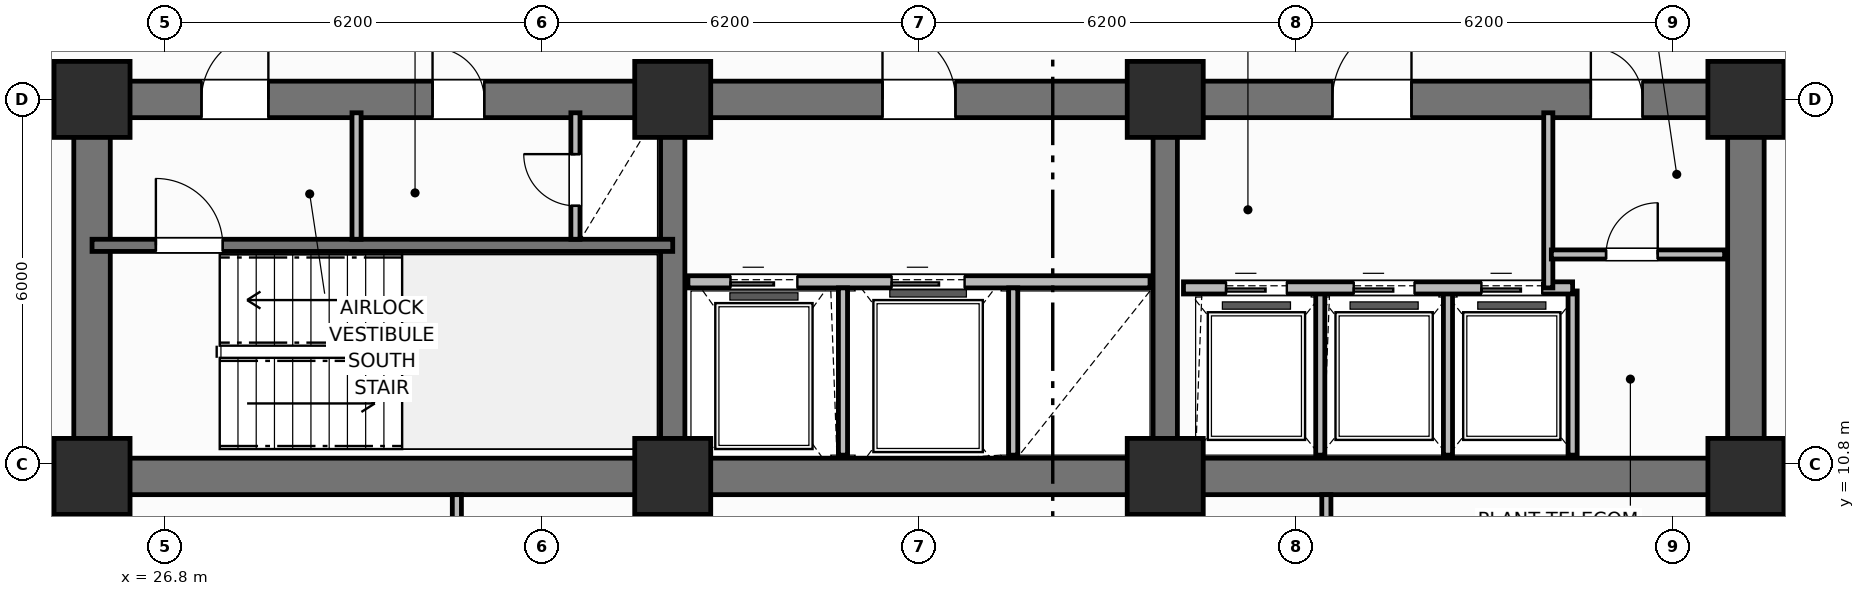
"""IFC4 building model, lengths in metres.
Left out: names, types, materials, properties, quantities, classifications, styles, units other than length and angle.
Written with IfcOpenShell. Run it as: python <this file> out.ifc"""

import sys

from ifc_helpers import new_model, si_unit, direction, frame, frame_2d, origin, origin_2d, place, context, subcontext, project, spatial, rectangle, extrude, element, fill, save


model = new_model("IFC4")
c1 = context("Model", 3, precision=1e-05, world=origin(), true_north=direction((0.0, 1.0)))
c2 = subcontext(c1, "Body", "Model", "MODEL_VIEW")
j1 = project(units=[si_unit("LENGTHUNIT", "METRE"), si_unit("PLANEANGLEUNIT", "RADIAN")], contexts=[c1])
p1 = place(None, origin())
s1 = spatial("IfcSite", under=j1, at=p1, CompositionType="ELEMENT")
p2 = place(p1, origin())
s2 = spatial("IfcBuilding", under=s1, at=p2, CompositionType="ELEMENT")
p3 = place(p2, frame((0.0, 0.0, 47.3)))
s3 = spatial("IfcBuildingStorey", under=s2, at=p3, CompositionType="ELEMENT", Elevation=47.3)
p4 = place(p3, frame((52.8, 10.6, 0.0), z_axis=(0.0, 0.0, 1.0), x_axis=(-1.0, 0.0, 0.0)))
e1 = element("IfcWall", 1, at=p4, inside=s3, PredefinedType="SHEAR", context=c2, shape_type="SweptSolid", body=[
    extrude(rectangle(XDim=27.2, YDim=0.6, at=frame_2d((13.6, 0.0))), origin(), (0.0, 0.0, 1.0), 3.7),
])
for number, where, z_axis, x_axis in (
    (2, (25.6, 10.9, 0.0), (0.0, 0.0, 1.0), (0.0, 1.0, 0.0)),
    (3, (52.8, 10.9, 0.0), (0.0, 0.0, 1.0), (0.0, 1.0, 0.0)),
):
    element("IfcWall", number, at=place(p3, frame(where, z_axis=z_axis, x_axis=x_axis)), inside=s3, PredefinedType="SHEAR", context=c2, shape_type="SweptSolid", body=[
        extrude(rectangle(XDim=5.6, YDim=0.6, at=frame_2d((2.8, 0.0))), origin(), (0.0, 0.0, 1.0), 3.7),
    ])
p5 = place(p3, frame((25.6, 16.8, 0.0), z_axis=(0.0, 0.0, 1.0), x_axis=(1.0, 0.0, 0.0)))
e4 = element("IfcWall", 4, at=p5, inside=s3, PredefinedType="SHEAR", context=c2, shape_type="SweptSolid", body=[
    extrude(rectangle(XDim=27.2, YDim=0.6, at=frame_2d((13.6, 0.0))), origin(), (0.0, 0.0, 1.0), 3.7),
])
p6 = place(p5, frame((1.8, 0.0, 0.0)))
e5 = element("IfcOpeningElement", 5, at=p6, cuts=e4, PredefinedType="OPENING", context=c2, shape_type="SweptSolid", body=[
    extrude(rectangle(XDim=1.1, YDim=2.15, at=frame_2d((0.55, 1.075))), frame((0.0, 0.31, 0.0), z_axis=(0.0, -1.0, 0.0), x_axis=(1.0, 0.0, 0.0)), (0.0, 0.0, 1.0), 0.62),
])
p7 = place(p5, frame((5.6, 0.0, 0.0)))
e6 = element("IfcOpeningElement", 6, at=p7, cuts=e4, PredefinedType="OPENING", context=c2, shape_type="SweptSolid", body=[
    extrude(rectangle(XDim=0.85, YDim=2.1, at=frame_2d((0.425, 1.05))), frame((0.0, 0.31, 0.0), z_axis=(0.0, -1.0, 0.0), x_axis=(1.0, 0.0, 0.0)), (0.0, 0.0, 1.0), 0.62),
])
p8 = place(p5, frame((13.0, 0.0, 0.0)))
e7 = element("IfcOpeningElement", 7, at=p8, cuts=e4, PredefinedType="OPENING", context=c2, shape_type="SweptSolid", body=[
    extrude(rectangle(XDim=1.2, YDim=2.15, at=frame_2d((0.6, 1.075))), frame((0.0, 0.31, 0.0), z_axis=(0.0, -1.0, 0.0), x_axis=(1.0, 0.0, 0.0)), (0.0, 0.0, 1.0), 0.62),
])
p9 = place(p5, frame((20.4, 0.0, 0.0)))
e8 = element("IfcOpeningElement", 8, at=p9, cuts=e4, PredefinedType="OPENING", context=c2, shape_type="SweptSolid", body=[
    extrude(rectangle(XDim=1.3, YDim=2.2, at=frame_2d((0.65, 1.1))), frame((0.0, 0.31, 0.0), z_axis=(0.0, -1.0, 0.0), x_axis=(1.0, 0.0, 0.0)), (0.0, 0.0, 1.0), 0.62),
])
p10 = place(p5, frame((24.65, 0.0, 0.0)))
e9 = element("IfcOpeningElement", 9, at=p10, cuts=e4, PredefinedType="OPENING", context=c2, shape_type="SweptSolid", body=[
    extrude(rectangle(XDim=0.85, YDim=2.1, at=frame_2d((0.425, 1.05))), frame((0.0, 0.31, 0.0), z_axis=(0.0, -1.0, 0.0), x_axis=(1.0, 0.0, 0.0)), (0.0, 0.0, 1.0), 0.62),
])
for number, where, z_axis, x_axis in (
    (10, (35.15, 10.9, 0.0), (0.0, 0.0, 1.0), (0.0, 1.0, 0.0)),
    (11, (43.25, 10.9, 0.0), (0.0, 0.0, 1.0), (0.0, 1.0, 0.0)),
):
    element("IfcWall", number, at=place(p3, frame(where, z_axis=z_axis, x_axis=x_axis)), inside=s3, PredefinedType="SHEAR", context=c2, shape_type="SweptSolid", body=[
        extrude(rectangle(XDim=5.6, YDim=0.4, at=frame_2d((2.8, 0.0))), origin(), (0.0, 0.0, 1.0), 3.7),
    ])
for number, where, z_axis, x_axis in (
    (12, (25.6, 10.6, 0.0), (0.0, 0.0, 1.0), (1.0, 0.0, 0.0)),
    (13, (25.6, 16.8, 0.0), (0.0, 0.0, 1.0), (1.0, 0.0, 0.0)),
    (14, (35.15, 10.6, 0.0), (0.0, 0.0, 1.0), (1.0, 0.0, 0.0)),
    (15, (35.15, 16.8, 0.0), (0.0, 0.0, 1.0), (1.0, 0.0, 0.0)),
    (16, (43.25, 10.6, 0.0), (0.0, 0.0, 1.0), (1.0, 0.0, 0.0)),
    (17, (43.25, 16.8, 0.0), (0.0, 0.0, 1.0), (1.0, 0.0, 0.0)),
    (18, (52.8, 10.6, 0.0), (0.0, 0.0, 1.0), (1.0, 0.0, 0.0)),
    (19, (52.8, 16.8, 0.0), (0.0, 0.0, 1.0), (1.0, 0.0, 0.0)),
):
    element("IfcColumn", number, at=place(p3, frame(where, z_axis=z_axis, x_axis=x_axis)), inside=s3, PredefinedType="COLUMN", context=c2, shape_type="SweptSolid", body=[
        extrude(rectangle(XDim=1.25, YDim=1.25, at=origin_2d()), origin(), (0.0, 0.0, 1.0), 3.7),
    ])
p11 = place(p3, frame((25.6, 14.4, 0.0), z_axis=(0.0, 0.0, 1.0), x_axis=(1.0, 0.0, 0.0)))
e20 = element("IfcWall", 20, at=p11, inside=s3, PredefinedType="SHEAR", context=c2, shape_type="SweptSolid", body=[
    extrude(rectangle(XDim=9.55, YDim=0.2, at=frame_2d((4.775, 0.0))), origin(), (0.0, 0.0, 1.0), 3.7),
])
p12 = place(p11, frame((1.05, 0.0, 0.0)))
e21 = element("IfcOpeningElement", 21, at=p12, cuts=e20, PredefinedType="OPENING", context=c2, shape_type="SweptSolid", body=[
    extrude(rectangle(XDim=1.1, YDim=2.15, at=frame_2d((0.55, 1.075))), frame((0.0, 0.11, 0.0), z_axis=(0.0, -1.0, 0.0), x_axis=(1.0, 0.0, 0.0)), (0.0, 0.0, 1.0), 0.22),
])
p13 = place(p3, frame((29.95, 14.5, 0.0), z_axis=(0.0, 0.0, 1.0), x_axis=(0.0, 1.0, 0.0)))
e22 = element("IfcWall", 22, at=p13, inside=s3, PredefinedType="PARTITIONING", context=c2, shape_type="SweptSolid", body=[
    extrude(rectangle(XDim=2.08, YDim=0.15, at=frame_2d((1.04, 0.0))), origin(), (0.0, 0.0, 1.0), 2.53),
])
p14 = place(p3, frame((33.55, 14.5, 0.0), z_axis=(0.0, 0.0, 1.0), x_axis=(0.0, 1.0, 0.0)))
e23 = element("IfcWall", 23, at=p14, inside=s3, PredefinedType="PARTITIONING", context=c2, shape_type="SweptSolid", body=[
    extrude(rectangle(XDim=2.08, YDim=0.15, at=frame_2d((1.04, 0.0))), origin(), (0.0, 0.0, 1.0), 2.53),
])
p15 = place(p14, frame((0.55, 0.0, 0.0)))
e24 = element("IfcOpeningElement", 24, at=p15, cuts=e23, PredefinedType="OPENING", context=c2, shape_type="SweptSolid", body=[
    extrude(rectangle(XDim=0.85, YDim=2.05, at=frame_2d((0.425, 1.025))), frame((0.0, 0.085, 0.0), z_axis=(0.0, -1.0, 0.0), x_axis=(1.0, 0.0, 0.0)), (0.0, 0.0, 1.0), 0.17),
])
p16 = place(p3, frame((35.4, 13.8, 0.0), z_axis=(0.0, 0.0, 1.0), x_axis=(1.0, 0.0, 0.0)))
e25 = element("IfcWall", 25, at=p16, inside=s3, PredefinedType="PARTITIONING", context=c2, shape_type="SweptSolid", body=[
    extrude(rectangle(XDim=7.6, YDim=0.2, at=frame_2d((3.8, 0.0))), origin(), (0.0, 0.0, 1.0), 2.3),
])
p17 = place(p16, frame((0.7, 0.0, 0.0)))
e26 = element("IfcOpeningElement", 26, at=p17, cuts=e25, PredefinedType="OPENING", context=c2, shape_type="SweptSolid", body=[
    extrude(rectangle(XDim=1.1, YDim=2.15, at=frame_2d((0.55, 1.075))), frame((0.0, 0.11, 0.0), z_axis=(0.0, -1.0, 0.0), x_axis=(1.0, 0.0, 0.0)), (0.0, 0.0, 1.0), 0.22),
])
p18 = place(p16, frame((3.35, 0.0, 0.0)))
e27 = element("IfcOpeningElement", 27, at=p18, cuts=e25, PredefinedType="OPENING", context=c2, shape_type="SweptSolid", body=[
    extrude(rectangle(XDim=1.2, YDim=2.15, at=frame_2d((0.6, 1.075))), frame((0.0, 0.11, 0.0), z_axis=(0.0, -1.0, 0.0), x_axis=(1.0, 0.0, 0.0)), (0.0, 0.0, 1.0), 0.22),
])
for number, where, z_axis, x_axis in (
    (28, (37.95, 10.95, 0.0), (0.0, 0.0, 1.0), (0.0, 1.0, 0.0)),
    (29, (40.75, 10.95, 0.0), (0.0, 0.0, 1.0), (0.0, 1.0, 0.0)),
):
    element("IfcWall", number, at=place(p3, frame(where, z_axis=z_axis, x_axis=x_axis)), inside=s3, PredefinedType="PARTITIONING", context=c2, shape_type="SweptSolid", body=[
        extrude(rectangle(XDim=2.75, YDim=0.15, at=frame_2d((1.375, 0.0))), origin(), (0.0, 0.0, 1.0), 2.53),
    ])
for number, where, z_axis, x_axis in (
    (30, (45.8, 10.95, 0.0), (0.0, 0.0, 1.0), (0.0, 1.0, 0.0)),
    (31, (47.9, 10.95, 0.0), (0.0, 0.0, 1.0), (0.0, 1.0, 0.0)),
    (32, (49.95, 10.95, 0.0), (0.0, 0.0, 1.0), (0.0, 1.0, 0.0)),
):
    element("IfcWall", number, at=place(p3, frame(where, z_axis=z_axis, x_axis=x_axis)), inside=s3, PredefinedType="PARTITIONING", context=c2, shape_type="SweptSolid", body=[
        extrude(rectangle(XDim=2.7, YDim=0.15, at=frame_2d((1.35, 0.0))), origin(), (0.0, 0.0, 1.0), 2.53),
    ])
p19 = place(p3, frame((43.55, 13.7, 0.0), z_axis=(0.0, 0.0, 1.0), x_axis=(1.0, 0.0, 0.0)))
e33 = element("IfcWall", 33, at=p19, inside=s3, PredefinedType="PARTITIONING", context=c2, shape_type="SweptSolid", body=[
    extrude(rectangle(XDim=6.4, YDim=0.2, at=frame_2d((3.2, 0.0))), origin(), (0.0, 0.0, 1.0), 2.53),
])
p20 = place(p19, frame((0.7, 0.0, 0.0)))
e34 = element("IfcOpeningElement", 34, at=p20, cuts=e33, PredefinedType="OPENING", context=c2, shape_type="SweptSolid", body=[
    extrude(rectangle(XDim=1.0, YDim=2.15, at=frame_2d((0.5, 1.075))), frame((0.0, 0.11, 0.0), z_axis=(0.0, -1.0, 0.0), x_axis=(1.0, 0.0, 0.0)), (0.0, 0.0, 1.0), 0.22),
])
p21 = place(p19, frame((2.8, 0.0, 0.0)))
e35 = element("IfcOpeningElement", 35, at=p21, cuts=e33, PredefinedType="OPENING", context=c2, shape_type="SweptSolid", body=[
    extrude(rectangle(XDim=1.0, YDim=2.15, at=frame_2d((0.5, 1.075))), frame((0.0, 0.11, 0.0), z_axis=(0.0, -1.0, 0.0), x_axis=(1.0, 0.0, 0.0)), (0.0, 0.0, 1.0), 0.22),
])
p22 = place(p19, frame((4.9, 0.0, 0.0)))
e36 = element("IfcOpeningElement", 36, at=p22, cuts=e33, PredefinedType="OPENING", context=c2, shape_type="SweptSolid", body=[
    extrude(rectangle(XDim=1.0, YDim=2.15, at=frame_2d((0.5, 1.075))), frame((0.0, 0.11, 0.0), z_axis=(0.0, -1.0, 0.0), x_axis=(1.0, 0.0, 0.0)), (0.0, 0.0, 1.0), 0.22),
])
p23 = place(p3, frame((49.55, 13.7, 0.0), z_axis=(0.0, 0.0, 1.0), x_axis=(0.0, 1.0, 0.0)))
e37 = element("IfcWall", 37, at=p23, inside=s3, PredefinedType="PARTITIONING", context=c2, shape_type="SweptSolid", body=[
    extrude(rectangle(XDim=2.88, YDim=0.15, at=frame_2d((1.44, 0.0))), origin(), (0.0, 0.0, 1.0), 2.53),
])
p24 = place(p3, frame((49.6, 14.25, 0.0), z_axis=(0.0, 0.0, 1.0), x_axis=(1.0, 0.0, 0.0)))
e38 = element("IfcWall", 38, at=p24, inside=s3, PredefinedType="PARTITIONING", context=c2, shape_type="SweptSolid", body=[
    extrude(rectangle(XDim=2.85, YDim=0.15, at=frame_2d((1.425, 0.0))), origin(), (0.0, 0.0, 1.0), 2.53),
])
p25 = place(p24, frame((0.9, 0.0, 0.0)))
e39 = element("IfcOpeningElement", 39, at=p25, cuts=e38, PredefinedType="OPENING", context=c2, shape_type="SweptSolid", body=[
    extrude(rectangle(XDim=0.85, YDim=2.1, at=frame_2d((0.425, 1.05))), frame((0.0, 0.085, 0.0), z_axis=(0.0, -1.0, 0.0), x_axis=(1.0, 0.0, 0.0)), (0.0, 0.0, 1.0), 0.17),
])
p26 = place(p3, frame((31.6, 4.97, 0.0), z_axis=(0.0, 0.0, 1.0), x_axis=(0.0, 1.0, 0.0)))
e40 = element("IfcWall", 40, at=p26, inside=s3, PredefinedType="PARTITIONING", context=c2, shape_type="SweptSolid", body=[
    extrude(rectangle(XDim=5.33, YDim=0.15, at=frame_2d((2.665, 0.0))), origin(), (0.0, 0.0, 1.0), 2.53),
])
p27 = place(p26, frame((1.95, 0.0, 0.0)))
e41 = element("IfcOpeningElement", 41, at=p27, cuts=e40, PredefinedType="OPENING", context=c2, shape_type="SweptSolid", body=[
    extrude(rectangle(XDim=0.9, YDim=2.1, at=frame_2d((0.45, 1.05))), frame((0.0, 0.085, 0.0), z_axis=(0.0, -1.0, 0.0), x_axis=(1.0, 0.0, 0.0)), (0.0, 0.0, 1.0), 0.17),
])
p28 = place(p3, frame((45.9, 4.97, 0.0), z_axis=(0.0, 0.0, 1.0), x_axis=(0.0, 1.0, 0.0)))
e42 = element("IfcWall", 42, at=p28, inside=s3, PredefinedType="PARTITIONING", context=c2, shape_type="SweptSolid", body=[
    extrude(rectangle(XDim=5.33, YDim=0.15, at=frame_2d((2.665, 0.0))), origin(), (0.0, 0.0, 1.0), 2.53),
])
p29 = place(p3, frame((25.4, 6.27, 0.0), z_axis=(0.0, 0.0, 1.0), x_axis=(0.0, 1.0, 0.0)))
e43 = element("IfcWall", 43, at=p29, inside=s3, PredefinedType="PARTITIONING", context=c2, shape_type="SweptSolid", body=[
    extrude(rectangle(XDim=4.03, YDim=0.2, at=frame_2d((2.015, 0.0))), origin(), (0.0, 0.0, 1.0), 2.53),
])
p30 = place(p29, frame((0.65, 0.0, 0.0)))
e44 = element("IfcOpeningElement", 44, at=p30, cuts=e43, PredefinedType="OPENING", context=c2, shape_type="SweptSolid", body=[
    extrude(rectangle(XDim=0.9, YDim=2.1, at=frame_2d((0.45, 1.05))), frame((0.0, 0.11, 0.0), z_axis=(0.0, -1.0, 0.0), x_axis=(1.0, 0.0, 0.0)), (0.0, 0.0, 1.0), 0.22),
])
p31 = place(p3, frame((53.0, 6.27, 0.0), z_axis=(0.0, 0.0, 1.0), x_axis=(0.0, 1.0, 0.0)))
e45 = element("IfcWall", 45, at=p31, inside=s3, PredefinedType="PARTITIONING", context=c2, shape_type="SweptSolid", body=[
    extrude(rectangle(XDim=4.03, YDim=0.2, at=frame_2d((2.015, 0.0))), origin(), (0.0, 0.0, 1.0), 2.53),
])
p32 = place(p31, frame((0.65, 0.0, 0.0)))
e46 = element("IfcOpeningElement", 46, at=p32, cuts=e45, PredefinedType="OPENING", context=c2, shape_type="SweptSolid", body=[
    extrude(rectangle(XDim=0.9, YDim=2.1, at=frame_2d((0.45, 1.05))), frame((0.0, 0.11, 0.0), z_axis=(0.0, -1.0, 0.0), x_axis=(1.0, 0.0, 0.0)), (0.0, 0.0, 1.0), 0.22),
])
p33 = place(p12, origin())
e47 = element("IfcDoor", 47, at=p33, inside=s3, OperationType="SINGLE_SWING_LEFT", PredefinedType="DOOR", context=c2, shape_type="SweptSolid", body=[
    extrude(rectangle(XDim=1.1, YDim=2.15, at=frame_2d((0.55, 1.075))), frame((0.0, 0.025, 0.0), z_axis=(0.0, -1.0, 0.0), x_axis=(1.0, 0.0, 0.0)), (0.0, 0.0, 1.0), 0.05),
])
fill(e21, e47)
p34 = place(p15, origin())
e48 = element("IfcDoor", 48, at=p34, inside=s3, OperationType="SINGLE_SWING_RIGHT", PredefinedType="TRAPDOOR", context=c2, shape_type="SweptSolid", body=[
    extrude(rectangle(XDim=0.85, YDim=2.05, at=frame_2d((0.425, 1.025))), frame((0.0, 0.025, 0.0), z_axis=(0.0, -1.0, 0.0), x_axis=(1.0, 0.0, 0.0)), (0.0, 0.0, 1.0), 0.05),
])
fill(e24, e48)
p35 = place(p17, origin())
e49 = element("IfcDoor", 49, at=p35, inside=s3, OperationType="SLIDING_TO_LEFT", PredefinedType="DOOR", context=c2, shape_type="SweptSolid", body=[
    extrude(rectangle(XDim=1.1, YDim=2.15, at=frame_2d((0.55, 1.075))), frame((0.0, 0.025, 0.0), z_axis=(0.0, -1.0, 0.0), x_axis=(1.0, 0.0, 0.0)), (0.0, 0.0, 1.0), 0.05),
])
fill(e26, e49)
p36 = place(p18, origin())
e50 = element("IfcDoor", 50, at=p36, inside=s3, OperationType="SLIDING_TO_LEFT", PredefinedType="DOOR", context=c2, shape_type="SweptSolid", body=[
    extrude(rectangle(XDim=1.2, YDim=2.15, at=frame_2d((0.6, 1.075))), frame((0.0, 0.025, 0.0), z_axis=(0.0, -1.0, 0.0), x_axis=(1.0, 0.0, 0.0)), (0.0, 0.0, 1.0), 0.05),
])
fill(e27, e50)
p37 = place(p20, origin())
e51 = element("IfcDoor", 51, at=p37, inside=s3, OperationType="SLIDING_TO_LEFT", PredefinedType="DOOR", context=c2, shape_type="SweptSolid", body=[
    extrude(rectangle(XDim=1.0, YDim=2.15, at=frame_2d((0.5, 1.075))), frame((0.0, 0.025, 0.0), z_axis=(0.0, -1.0, 0.0), x_axis=(1.0, 0.0, 0.0)), (0.0, 0.0, 1.0), 0.05),
])
fill(e34, e51)
p38 = place(p21, origin())
e52 = element("IfcDoor", 52, at=p38, inside=s3, OperationType="SLIDING_TO_LEFT", PredefinedType="DOOR", context=c2, shape_type="SweptSolid", body=[
    extrude(rectangle(XDim=1.0, YDim=2.15, at=frame_2d((0.5, 1.075))), frame((0.0, 0.025, 0.0), z_axis=(0.0, -1.0, 0.0), x_axis=(1.0, 0.0, 0.0)), (0.0, 0.0, 1.0), 0.05),
])
fill(e35, e52)
p39 = place(p22, origin())
e53 = element("IfcDoor", 53, at=p39, inside=s3, OperationType="SLIDING_TO_LEFT", PredefinedType="DOOR", context=c2, shape_type="SweptSolid", body=[
    extrude(rectangle(XDim=1.0, YDim=2.15, at=frame_2d((0.5, 1.075))), frame((0.0, 0.025, 0.0), z_axis=(0.0, -1.0, 0.0), x_axis=(1.0, 0.0, 0.0)), (0.0, 0.0, 1.0), 0.05),
])
fill(e36, e53)
p40 = place(p25, origin())
e54 = element("IfcDoor", 54, at=p40, inside=s3, OperationType="SINGLE_SWING_RIGHT", PredefinedType="DOOR", context=c2, shape_type="SweptSolid", body=[
    extrude(rectangle(XDim=0.85, YDim=2.1, at=frame_2d((0.425, 1.05))), frame((0.0, 0.025, 0.0), z_axis=(0.0, -1.0, 0.0), x_axis=(1.0, 0.0, 0.0)), (0.0, 0.0, 1.0), 0.05),
])
fill(e39, e54)
p41 = place(p6, origin())
e55 = element("IfcDoor", 55, at=p41, inside=s3, OperationType="SINGLE_SWING_RIGHT", PredefinedType="DOOR", context=c2, shape_type="SweptSolid", body=[
    extrude(rectangle(XDim=1.1, YDim=2.15, at=frame_2d((0.55, 1.075))), frame((0.0, 0.025, 0.0), z_axis=(0.0, -1.0, 0.0), x_axis=(1.0, 0.0, 0.0)), (0.0, 0.0, 1.0), 0.05),
])
fill(e5, e55)
p42 = place(p7, origin())
e56 = element("IfcDoor", 56, at=p42, inside=s3, OperationType="SINGLE_SWING_LEFT", PredefinedType="DOOR", context=c2, shape_type="SweptSolid", body=[
    extrude(rectangle(XDim=0.85, YDim=2.1, at=frame_2d((0.425, 1.05))), frame((0.0, 0.025, 0.0), z_axis=(0.0, -1.0, 0.0), x_axis=(1.0, 0.0, 0.0)), (0.0, 0.0, 1.0), 0.05),
])
fill(e6, e56)
p43 = place(p8, origin())
e57 = element("IfcDoor", 57, at=p43, inside=s3, OperationType="SINGLE_SWING_LEFT", PredefinedType="DOOR", context=c2, shape_type="SweptSolid", body=[
    extrude(rectangle(XDim=1.2, YDim=2.15, at=frame_2d((0.6, 1.075))), frame((0.0, 0.025, 0.0), z_axis=(0.0, -1.0, 0.0), x_axis=(1.0, 0.0, 0.0)), (0.0, 0.0, 1.0), 0.05),
])
fill(e7, e57)
p44 = place(p9, origin())
e58 = element("IfcDoor", 58, at=p44, inside=s3, OperationType="SINGLE_SWING_RIGHT", PredefinedType="DOOR", context=c2, shape_type="SweptSolid", body=[
    extrude(rectangle(XDim=1.3, YDim=2.2, at=frame_2d((0.65, 1.1))), frame((0.0, 0.025, 0.0), z_axis=(0.0, -1.0, 0.0), x_axis=(1.0, 0.0, 0.0)), (0.0, 0.0, 1.0), 0.05),
])
fill(e8, e58)
p45 = place(p10, origin())
e59 = element("IfcDoor", 59, at=p45, inside=s3, OperationType="SINGLE_SWING_LEFT", PredefinedType="DOOR", context=c2, shape_type="SweptSolid", body=[
    extrude(rectangle(XDim=0.85, YDim=2.1, at=frame_2d((0.425, 1.05))), frame((0.0, 0.025, 0.0), z_axis=(0.0, -1.0, 0.0), x_axis=(1.0, 0.0, 0.0)), (0.0, 0.0, 1.0), 0.05),
])
fill(e9, e59)
save(model, sys.argv[1])
